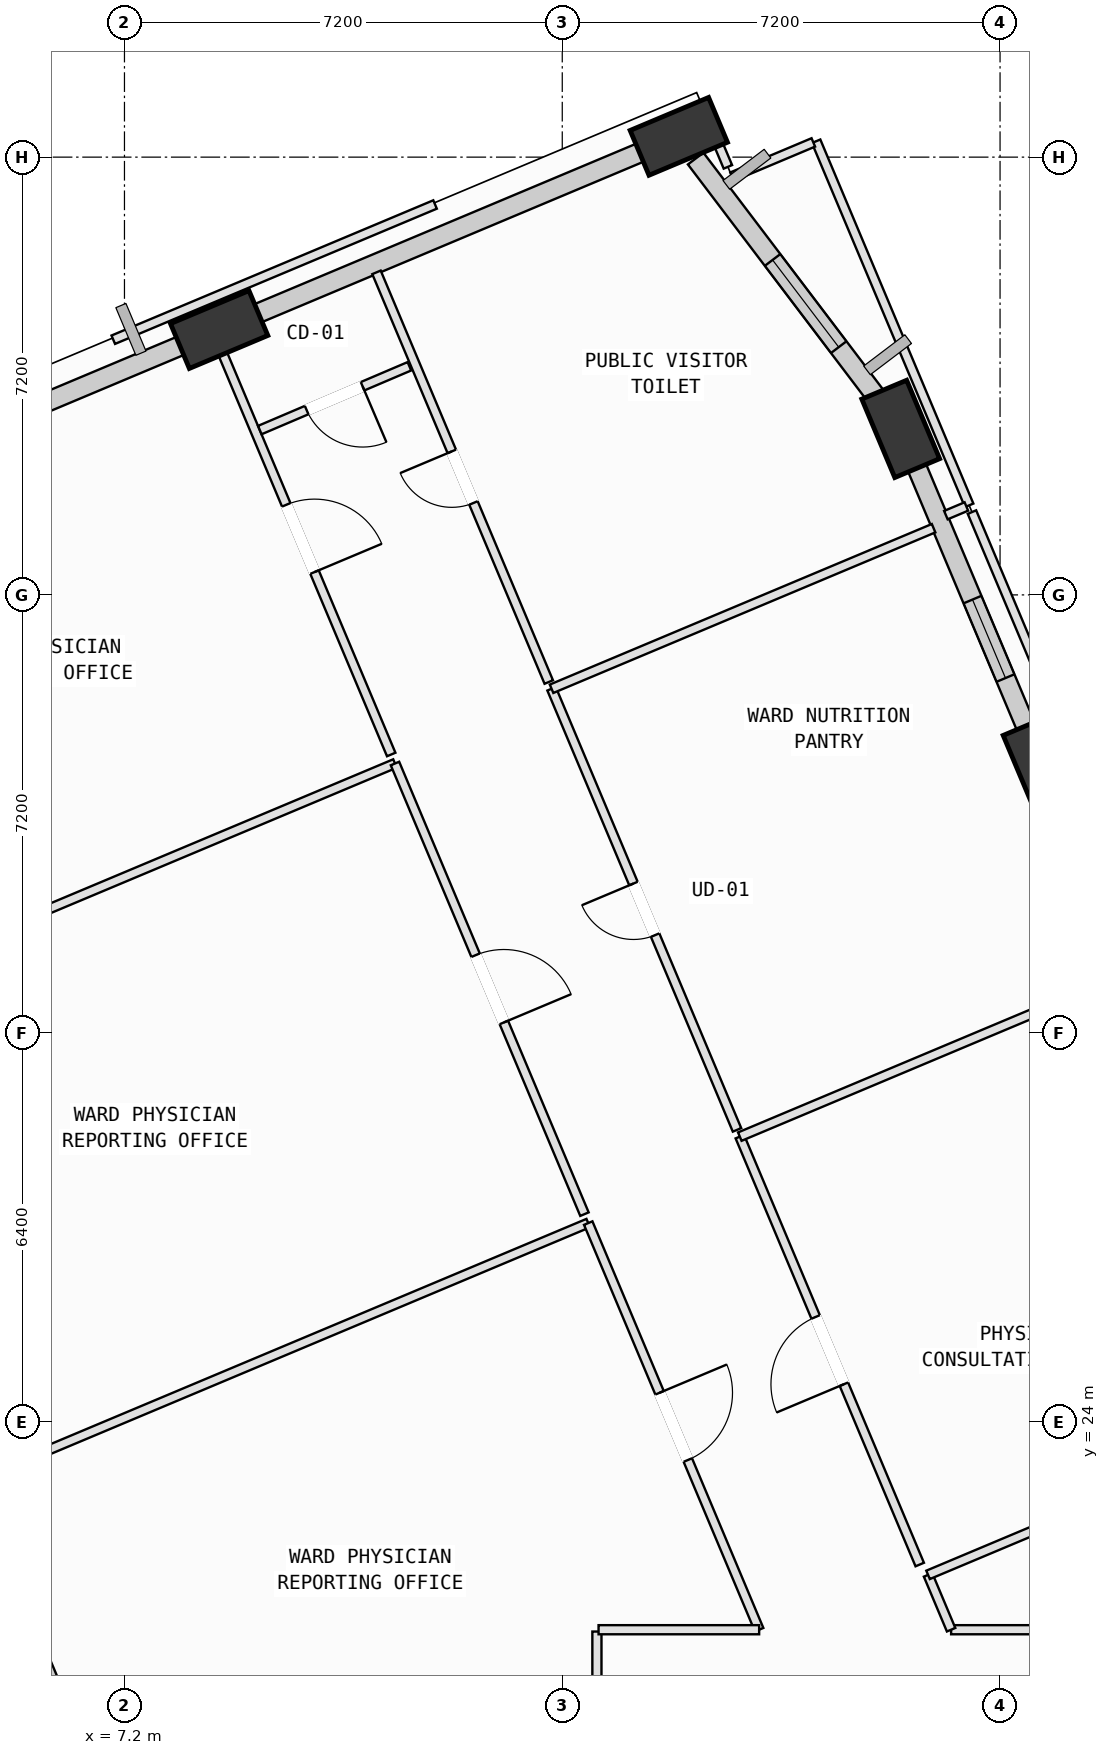
"""IFC4 building model, lengths in metres.
Left out: names, types, materials, properties, quantities, classifications, styles, units other than length and angle.
Written with IfcOpenShell. Run it as: python <this file> out.ifc"""

import sys

from ifc_helpers import new_model, si_unit, direction, frame, frame_2d, origin, origin_2d, place, context, subcontext, project, spatial, rectangle, extrude, element, fill, save


model = new_model("IFC4")
c1 = context("Model", 3, precision=1e-05, world=origin(), true_north=direction((0.0, 1.0)))
c2 = subcontext(c1, "Body", "Model", "MODEL_VIEW")
j1 = project(units=[si_unit("LENGTHUNIT", "METRE"), si_unit("PLANEANGLEUNIT", "RADIAN")], contexts=[c1])
p1 = place(None, origin())
s1 = spatial("IfcSite", under=j1, at=p1, CompositionType="ELEMENT")
p2 = place(p1, origin())
s2 = spatial("IfcBuilding", under=s1, at=p2, CompositionType="ELEMENT")
p3 = place(p2, frame((0.0, 0.0, 120.4)))
s3 = spatial("IfcBuildingStorey", under=s2, at=p3, CompositionType="ELEMENT", Elevation=120.4)
p4 = place(p3, frame((22.292, 34.799, 0.002), z_axis=(-0.040973075372, -0.047131231045, 0.998048021968), x_axis=(0.311183272161, 0.948604503294, 0.057571411811)))
e1 = element("IfcColumn", 1, at=p4, inside=s3, PredefinedType="COLUMN", context=c2, shape_type="SweptSolid", body=[
    extrude(rectangle(XDim=1.4, YDim=0.8, at=origin_2d()), origin(), (0.0, 0.0, 1.0), 4.004),
])
p5 = place(p3, frame((19.966, 40.33, 0.002), z_axis=(-0.063668290579, -0.056790167409, 0.996353966048), x_axis=(0.427498847838, 0.900588142351, 0.078649430732)))
e2 = element("IfcColumn", 2, at=p5, inside=s3, PredefinedType="COLUMN", context=c2, shape_type="SweptSolid", body=[
    extrude(rectangle(XDim=1.4, YDim=0.8, at=origin_2d()), origin(), (0.0, 0.0, 1.0), 4.011),
])
p6 = place(p3, frame((16.317, 45.142, 0.002), z_axis=(-0.083247666563, -0.071892952014, 0.993932205667), x_axis=(0.894040749575, -0.445953232902, 0.042624548837)))
e3 = element("IfcColumn", 3, at=p6, inside=s3, PredefinedType="COLUMN", context=c2, shape_type="SweptSolid", body=[
    extrude(rectangle(XDim=1.4, YDim=0.8, at=origin_2d()), origin(), (0.0, 0.0, 1.0), 4.021),
])
p7 = place(p3, frame((8.757, 41.964, 0.002), z_axis=(-0.069771417755, -0.102747656903, 0.992257460675), x_axis=(0.978659051429, -0.199775110531, 0.048128642913)))
e4 = element("IfcColumn", 4, at=p7, inside=s3, PredefinedType="COLUMN", context=c2, shape_type="SweptSolid", body=[
    extrude(rectangle(XDim=1.4, YDim=0.8, at=origin_2d()), origin(), (0.0, 0.0, 1.0), 4.028),
])
p8 = place(p3, frame((20.17, 39.847, 0.0), z_axis=(0.0, 0.0, 1.0), x_axis=(0.387505493495, -0.921867394212, 0.0)))
e5 = element("IfcWall", 5, at=p8, inside=s3, PredefinedType="SOLIDWALL", context=c2, shape_type="SweptSolid", body=[
    extrude(rectangle(XDim=5.047, YDim=0.32, at=frame_2d((2.523, 0.0))), origin(), (0.0, 0.0, 1.0), 3.165),
])
p9 = place(p8, frame((2.521, 0.0, 0.75)))
e6 = element("IfcOpeningElement", 6, at=p9, cuts=e5, PredefinedType="OPENING", context=c2, shape_type="SweptSolid", body=[
    extrude(rectangle(XDim=1.4, YDim=1.85, at=frame_2d((0.7, 0.925))), frame((0.0, 0.17, 0.0), z_axis=(0.0, -1.0, 0.0), x_axis=(1.0, 0.0, 0.0)), (0.0, 0.0, 1.0), 0.34),
])
p10 = place(p3, frame((16.594, 44.777, 0.0), z_axis=(0.0, 0.0, 1.0), x_axis=(0.604347929442, -0.796720515726, 0.0)))
e7 = element("IfcWall", 7, at=p10, inside=s3, PredefinedType="SOLIDWALL", context=c2, shape_type="SweptSolid", body=[
    extrude(rectangle(XDim=5.128, YDim=0.32, at=frame_2d((2.564, 0.0))), origin(), (0.0, 0.0, 1.0), 3.165),
])
p11 = place(p10, frame((2.094, 0.0, 0.75)))
e8 = element("IfcOpeningElement", 8, at=p11, cuts=e7, PredefinedType="OPENING", context=c2, shape_type="SweptSolid", body=[
    extrude(rectangle(XDim=1.8, YDim=2.05, at=frame_2d((0.9, 1.025))), frame((0.0, 0.17, 0.0), z_axis=(0.0, -1.0, 0.0), x_axis=(1.0, 0.0, 0.0)), (0.0, 0.0, 1.0), 0.34),
])
p12 = place(p3, frame((9.004, 42.068, 0.0), z_axis=(0.0, 0.0, 1.0), x_axis=(0.921864651892, 0.387512017352, 0.0)))
e9 = element("IfcWall", 9, at=p12, inside=s3, PredefinedType="SOLIDWALL", context=c2, shape_type="SweptSolid", body=[
    extrude(rectangle(XDim=7.231, YDim=0.32, at=frame_2d((3.615, 0.0))), origin(), (0.0, 0.0, 1.0), 3.165),
])
p13 = place(p3, frame((1.422, 38.881, 0.0), z_axis=(0.0, 0.0, 1.0), x_axis=(0.921872247249, 0.387493948019, 0.0)))
e10 = element("IfcWall", 10, at=p13, inside=s3, PredefinedType="SOLIDWALL", context=c2, shape_type="SweptSolid", body=[
    extrude(rectangle(XDim=7.27, YDim=0.32, at=frame_2d((3.635, 0.0))), origin(), (0.0, 0.0, 1.0), 3.165),
])
p14 = place(p3, frame((7.435, 16.208, 0.0), z_axis=(0.0, 0.0, 1.0), x_axis=(-0.387540340387, 0.921852745601, 0.0)))
e11 = element("IfcWall", 11, at=p14, inside=s3, PredefinedType="SOLIDWALL", context=c2, shape_type="SweptSolid", body=[
    extrude(rectangle(XDim=5.662, YDim=0.32, at=frame_2d((2.831, 0.0))), origin(), (0.0, 0.0, 1.0), 3.165),
])
p15 = place(p14, frame((2.23, 0.0, 0.75)))
e12 = element("IfcOpeningElement", 12, at=p15, cuts=e11, PredefinedType="OPENING", context=c2, shape_type="SweptSolid", body=[
    extrude(rectangle(XDim=1.2, YDim=1.75, at=frame_2d((0.6, 0.875))), frame((0.0, 0.17, 0.0), z_axis=(0.0, -1.0, 0.0), x_axis=(1.0, 0.0, 0.0)), (0.0, 0.0, 1.0), 0.34),
])
p16 = place(p3, frame((14.97, 20.55, 0.0), z_axis=(0.0, 0.0, 1.0), x_axis=(0.0, -1.0, 0.0)))
e13 = element("IfcWall", 13, at=p16, inside=s3, PredefinedType="PARTITIONING", context=c2, shape_type="SweptSolid", body=[
    extrude(rectangle(XDim=1.943, YDim=0.15, at=frame_2d((0.972, 0.0))), origin(), (0.0, 0.0, 1.0), 3.78),
])
p17 = place(p3, frame((4.719, 23.019, 0.0), z_axis=(0.0, 0.0, 1.0), x_axis=(0.921861546859, 0.387519403931, 0.0)))
e14 = element("IfcWall", 14, at=p17, inside=s3, PredefinedType="PARTITIONING", context=c2, shape_type="SweptSolid", body=[
    extrude(rectangle(XDim=10.965, YDim=0.15, at=frame_2d((5.482, 0.0))), origin(), (0.0, 0.0, 1.0), 3.78),
])
p18 = place(p3, frame((14.827, 27.268, 0.0), z_axis=(0.0, 0.0, 1.0), x_axis=(0.387476197679, -0.921879708114, 0.0)))
e15 = element("IfcWall", 15, at=p18, inside=s3, PredefinedType="PARTITIONING", context=c2, shape_type="SweptSolid", body=[
    extrude(rectangle(XDim=7.255, YDim=0.15, at=frame_2d((3.627, 0.0))), origin(), (0.0, 0.0, 1.0), 3.78),
])
p19 = place(p18, frame((3.027, 0.0, 0.0)))
e16 = element("IfcOpeningElement", 16, at=p19, cuts=e15, PredefinedType="OPENING", context=c2, shape_type="SweptSolid", body=[
    extrude(rectangle(XDim=1.2, YDim=2.15, at=frame_2d((0.6, 1.075))), frame((0.0, 0.085, 0.0), z_axis=(0.0, -1.0, 0.0), x_axis=(1.0, 0.0, 0.0)), (0.0, 0.0, 1.0), 0.17),
])
p20 = place(p3, frame((17.638, 20.58, 0.0), z_axis=(0.0, 0.0, 1.0), x_axis=(-1.0, 0.0, 0.0)))
e17 = element("IfcWall", 17, at=p20, inside=s3, PredefinedType="PARTITIONING", context=c2, shape_type="SweptSolid", body=[
    extrude(rectangle(XDim=2.641, YDim=0.15, at=frame_2d((1.32, 0.0))), origin(), (0.0, 0.0, 1.0), 3.78),
])
p21 = place(p3, frame((1.541, 30.579, 0.0), z_axis=(0.0, 0.0, 1.0), x_axis=(0.921901315363, 0.387424785904, 0.0)))
e18 = element("IfcWall", 18, at=p21, inside=s3, PredefinedType="PARTITIONING", context=c2, shape_type="SweptSolid", body=[
    extrude(rectangle(XDim=10.964, YDim=0.15, at=frame_2d((5.482, 0.0))), origin(), (0.0, 0.0, 1.0), 3.78),
])
p22 = place(p3, frame((11.649, 34.827, 0.0), z_axis=(0.0, 0.0, 1.0), x_axis=(0.387547881375, -0.921849575387, 0.0)))
e19 = element("IfcWall", 19, at=p22, inside=s3, PredefinedType="PARTITIONING", context=c2, shape_type="SweptSolid", body=[
    extrude(rectangle(XDim=8.04, YDim=0.15, at=frame_2d((4.02, 0.0))), origin(), (0.0, 0.0, 1.0), 3.78),
])
p23 = place(p22, frame((3.42, 0.0, 0.0)))
e20 = element("IfcOpeningElement", 20, at=p23, cuts=e19, PredefinedType="OPENING", context=c2, shape_type="SweptSolid", body=[
    extrude(rectangle(XDim=1.2, YDim=2.15, at=frame_2d((0.6, 1.075))), frame((0.0, 0.085, 0.0), z_axis=(0.0, -1.0, 0.0), x_axis=(1.0, 0.0, 0.0)), (0.0, 0.0, 1.0), 0.17),
])
p24 = place(p3, frame((8.058, 41.855, 0.0), z_axis=(0.0, 0.0, 1.0), x_axis=(0.922089032522, 0.386977797945, 0.0)))
e21 = element("IfcWall", 21, at=p24, inside=s3, PredefinedType="PARTITIONING", context=c2, shape_type="SweptSolid", body=[
    extrude(rectangle(XDim=0.587, YDim=0.15, at=frame_2d((0.293, 0.0))), origin(), (0.0, 0.0, 1.0), 3.78),
])
p25 = place(p3, frame((8.599, 42.082, 0.0), z_axis=(0.0, 0.0, 1.0), x_axis=(0.387550108115, -0.921848639257, 0.0)))
e22 = element("IfcWall", 22, at=p25, inside=s3, PredefinedType="PARTITIONING", context=c2, shape_type="SweptSolid", body=[
    extrude(rectangle(XDim=7.709, YDim=0.15, at=frame_2d((3.855, 0.0))), origin(), (0.0, 0.0, 1.0), 2.965),
])
p26 = place(p25, frame((3.255, 0.0, 0.0)))
e23 = element("IfcOpeningElement", 23, at=p26, cuts=e22, PredefinedType="OPENING", context=c2, shape_type="SweptSolid", body=[
    extrude(rectangle(XDim=1.2, YDim=2.15, at=frame_2d((0.6, 1.075))), frame((0.0, 0.085, 0.0), z_axis=(0.0, -1.0, 0.0), x_axis=(1.0, 0.0, 0.0)), (0.0, 0.0, 1.0), 0.17),
])
p27 = place(p3, frame((27.428, 20.58, 0.0), z_axis=(0.0, 0.0, 1.0), x_axis=(-1.0, 0.0, 0.0)))
e24 = element("IfcWall", 24, at=p27, inside=s3, PredefinedType="PARTITIONING", context=c2, shape_type="SweptSolid", body=[
    extrude(rectangle(XDim=6.633, YDim=0.15, at=frame_2d((3.316, 0.0))), origin(), (0.0, 0.0, 1.0), 3.78),
])
p28 = place(p27, frame((2.717, 0.0, 0.0)))
e25 = element("IfcOpeningElement", 25, at=p28, cuts=e24, PredefinedType="OPENING", context=c2, shape_type="SweptSolid", body=[
    extrude(rectangle(XDim=1.2, YDim=2.15, at=frame_2d((0.6, 1.075))), frame((0.0, 0.085, 0.0), z_axis=(0.0, -1.0, 0.0), x_axis=(1.0, 0.0, 0.0)), (0.0, 0.0, 1.0), 0.17),
])
p29 = place(p3, frame((20.795, 20.58, 0.0), z_axis=(0.0, 0.0, 1.0), x_axis=(-0.387342801036, 0.921935764837, 0.0)))
e26 = element("IfcWall", 26, at=p29, inside=s3, PredefinedType="PARTITIONING", context=c2, shape_type="SweptSolid", body=[
    extrude(rectangle(XDim=0.978, YDim=0.15, at=frame_2d((0.489, 0.0))), origin(), (0.0, 0.0, 1.0), 3.78),
])
p30 = place(p3, frame((20.416, 21.482, 0.0), z_axis=(0.0, 0.0, 1.0), x_axis=(0.921833906967, 0.38758514931, 0.0)))
e27 = element("IfcWall", 27, at=p30, inside=s3, PredefinedType="PARTITIONING", context=c2, shape_type="SweptSolid", body=[
    extrude(rectangle(XDim=6.755, YDim=0.15, at=frame_2d((3.377, 0.0))), origin(), (0.0, 0.0, 1.0), 3.78),
])
p31 = place(p3, frame((20.279, 21.652, 0.0), z_axis=(0.0, 0.0, 1.0), x_axis=(-0.38757659616, 0.921837503093, 0.0)))
e28 = element("IfcWall", 28, at=p31, inside=s3, PredefinedType="PARTITIONING", context=c2, shape_type="SweptSolid", body=[
    extrude(rectangle(XDim=7.635, YDim=0.15, at=frame_2d((3.817, 0.0))), origin(), (0.0, 0.0, 1.0), 3.78),
])
p32 = place(p31, frame((3.217, 0.0, 0.0)))
e29 = element("IfcOpeningElement", 29, at=p32, cuts=e28, PredefinedType="OPENING", context=c2, shape_type="SweptSolid", body=[
    extrude(rectangle(XDim=1.2, YDim=2.15, at=frame_2d((0.6, 1.075))), frame((0.0, 0.085, 0.0), z_axis=(0.0, -1.0, 0.0), x_axis=(1.0, 0.0, 0.0)), (0.0, 0.0, 1.0), 0.17),
])
p33 = place(p3, frame((17.32, 28.69, 0.0), z_axis=(0.0, 0.0, 1.0), x_axis=(0.921811932434, 0.387637409473, 0.0)))
e30 = element("IfcWall", 30, at=p33, inside=s3, PredefinedType="PARTITIONING", context=c2, shape_type="SweptSolid", body=[
    extrude(rectangle(XDim=6.816, YDim=0.15, at=frame_2d((3.408, 0.0))), origin(), (0.0, 0.0, 1.0), 3.78),
])
p34 = place(p3, frame((17.274, 28.801, 0.0), z_axis=(0.0, 0.0, 1.0), x_axis=(-0.387529923364, 0.921857124775, 0.0)))
e31 = element("IfcWall", 31, at=p34, inside=s3, PredefinedType="PARTITIONING", context=c2, shape_type="SweptSolid", body=[
    extrude(rectangle(XDim=7.87, YDim=0.15, at=frame_2d((3.935, 0.0))), origin(), (0.0, 0.0, 1.0), 3.78),
])
p35 = place(p34, frame((3.475, 0.0, 0.0)))
e32 = element("IfcOpeningElement", 32, at=p35, cuts=e31, PredefinedType="OPENING", context=c2, shape_type="SweptSolid", body=[
    extrude(rectangle(XDim=0.92, YDim=2.1, at=frame_2d((0.46, 1.05))), frame((0.0, 0.085, 0.0), z_axis=(0.0, -1.0, 0.0), x_axis=(1.0, 0.0, 0.0)), (0.0, 0.0, 1.0), 0.17),
])
p36 = place(p3, frame((14.224, 36.056, 0.0), z_axis=(0.0, 0.0, 1.0), x_axis=(0.921863124429, 0.387515651062, 0.0)))
e33 = element("IfcWall", 33, at=p36, inside=s3, PredefinedType="PARTITIONING", context=c2, shape_type="SweptSolid", body=[
    extrude(rectangle(XDim=6.815, YDim=0.15, at=frame_2d((3.408, 0.0))), origin(), (0.0, 0.0, 1.0), 3.78),
])
p37 = place(p3, frame((21.138, 38.962, 0.0), z_axis=(0.0, 0.0, 1.0), x_axis=(0.387556286233, -0.921846041919, 0.0)))
e34 = element("IfcWall", 34, at=p37, inside=s3, PredefinedType="PARTITIONING", context=c2, shape_type="SweptSolid", body=[
    extrude(rectangle(XDim=7.87, YDim=0.15, at=frame_2d((3.935, 0.0))), origin(), (0.0, 0.0, 1.0), 3.78),
])
p38 = place(p3, frame((18.575, 45.061, 0.0), z_axis=(0.0, 0.0, 1.0), x_axis=(0.387509152275, -0.921865856241, 0.0)))
e35 = element("IfcWall", 35, at=p38, inside=s3, PredefinedType="PARTITIONING", context=c2, shape_type="SweptSolid", body=[
    extrude(rectangle(XDim=6.496, YDim=0.15, at=frame_2d((3.248, 0.0))), origin(), (0.0, 0.0, 1.0), 3.78),
])
p39 = place(p3, frame((21.046, 39.054, 0.0), z_axis=(0.0, 0.0, 1.0), x_axis=(-0.921647946152, -0.388027142547, 0.0)))
e36 = element("IfcWall", 36, at=p39, inside=s3, PredefinedType="PARTITIONING", context=c2, shape_type="SweptSolid", body=[
    extrude(rectangle(XDim=0.365, YDim=0.15, at=frame_2d((0.183, 0.0))), origin(), (0.0, 0.0, 1.0), 3.78),
])
p40 = place(p3, frame((14.178, 36.167, 0.0), z_axis=(0.0, 0.0, 1.0), x_axis=(-0.387585091444, 0.921833931297, 0.0)))
e37 = element("IfcWall", 37, at=p40, inside=s3, PredefinedType="PARTITIONING", context=c2, shape_type="SweptSolid", body=[
    extrude(rectangle(XDim=7.309, YDim=0.15, at=frame_2d((3.655, 0.0))), origin(), (0.0, 0.0, 1.0), 3.78),
])
p41 = place(p40, frame((3.195, 0.0, 0.0)))
e38 = element("IfcOpeningElement", 38, at=p41, cuts=e37, PredefinedType="OPENING", context=c2, shape_type="SweptSolid", body=[
    extrude(rectangle(XDim=0.92, YDim=2.1, at=frame_2d((0.46, 1.05))), frame((0.0, 0.085, 0.0), z_axis=(0.0, -1.0, 0.0), x_axis=(1.0, 0.0, 0.0)), (0.0, 0.0, 1.0), 0.17),
])
p42 = place(p3, frame((15.596, 45.045, 0.0), z_axis=(0.0, 0.0, 1.0), x_axis=(0.92186648398, 0.38750765891, 0.0)))
e39 = element("IfcWall", 39, at=p42, inside=s3, PredefinedType="PARTITIONING", context=c2, shape_type="SweptSolid", body=[
    extrude(rectangle(XDim=1.252, YDim=0.15, at=frame_2d((0.626, 0.0))), origin(), (0.0, 0.0, 1.0), 3.165),
])
p43 = place(p3, frame((16.769, 45.484, 0.0), z_axis=(0.0, 0.0, 1.0), x_axis=(0.387699355128, -0.921785880795, 0.0)))
e40 = element("IfcWall", 40, at=p43, inside=s3, PredefinedType="PARTITIONING", context=c2, shape_type="SweptSolid", body=[
    extrude(rectangle(XDim=0.916, YDim=0.15, at=frame_2d((0.458, 0.0))), origin(), (0.0, 0.0, 1.0), 3.78),
])
p44 = place(p3, frame((17.192, 44.479, 0.0), z_axis=(0.0, 0.0, 1.0), x_axis=(0.921641710071, 0.388041954249, 0.0)))
e41 = element("IfcWall", 41, at=p44, inside=s3, PredefinedType="PARTITIONING", context=c2, shape_type="SweptSolid", body=[
    extrude(rectangle(XDim=1.451, YDim=0.15, at=frame_2d((0.726, 0.0))), origin(), (0.0, 0.0, 1.0), 3.78),
])
p45 = place(p3, frame((7.016, 41.797, 0.0), z_axis=(0.0, 0.0, 1.0), x_axis=(0.921904949916, 0.387416137146, 0.0)))
e42 = element("IfcWall", 42, at=p45, inside=s3, PredefinedType="PARTITIONING", context=c2, shape_type="SweptSolid", body=[
    extrude(rectangle(XDim=5.74, YDim=0.15, at=frame_2d((2.87, 0.0))), origin(), (0.0, 0.0, 1.0), 3.78),
])
p46 = place(p3, frame((11.886, 41.36, 0.0), z_axis=(0.0, 0.0, 1.0), x_axis=(-0.919847133492, -0.392277008001, 0.0)))
e43 = element("IfcWall", 43, at=p46, inside=s3, PredefinedType="PARTITIONING", context=c2, shape_type="SweptSolid", body=[
    extrude(rectangle(XDim=2.674, YDim=0.15, at=frame_2d((1.337, 0.0))), origin(), (0.0, 0.0, 1.0), 3.78),
])
p47 = place(p46, frame((0.837, 0.0, 0.0)))
e44 = element("IfcOpeningElement", 44, at=p47, cuts=e43, PredefinedType="OPENING", context=c2, shape_type="SweptSolid", body=[
    extrude(rectangle(XDim=1.0, YDim=2.12, at=frame_2d((0.5, 1.06))), frame((0.0, 0.085, 0.0), z_axis=(0.0, -1.0, 0.0), x_axis=(1.0, 0.0, 0.0)), (0.0, 0.0, 1.0), 0.17),
])
p48 = place(p9, origin())
e45 = element("IfcWindow", 45, at=p48, inside=s3, PartitioningType="SINGLE_PANEL", PredefinedType="WINDOW", context=c2, shape_type="SweptSolid", body=[
    extrude(rectangle(XDim=1.4, YDim=1.85, at=frame_2d((0.7, 0.925))), frame((0.0, 0.03, 0.0), z_axis=(0.0, -1.0, 0.0), x_axis=(1.0, 0.0, 0.0)), (0.0, 0.0, 1.0), 0.06),
])
fill(e6, e45)
p49 = place(p11, origin())
e46 = element("IfcWindow", 46, at=p49, inside=s3, PartitioningType="SINGLE_PANEL", PredefinedType="WINDOW", context=c2, shape_type="SweptSolid", body=[
    extrude(rectangle(XDim=1.8, YDim=2.05, at=frame_2d((0.9, 1.025))), frame((0.0, 0.03, 0.0), z_axis=(0.0, -1.0, 0.0), x_axis=(1.0, 0.0, 0.0)), (0.0, 0.0, 1.0), 0.06),
])
fill(e8, e46)
p50 = place(p19, origin())
e47 = element("IfcDoor", 47, at=p50, inside=s3, OperationType="SINGLE_SWING_LEFT", PredefinedType="DOOR", context=c2, shape_type="SweptSolid", body=[
    extrude(rectangle(XDim=1.2, YDim=2.15, at=frame_2d((0.6, 1.075))), frame((0.0, 0.025, 0.0), z_axis=(0.0, -1.0, 0.0), x_axis=(1.0, 0.0, 0.0)), (0.0, 0.0, 1.0), 0.05),
])
fill(e16, e47)
p51 = place(p23, origin())
e48 = element("IfcDoor", 48, at=p51, inside=s3, OperationType="SINGLE_SWING_RIGHT", PredefinedType="DOOR", context=c2, shape_type="SweptSolid", body=[
    extrude(rectangle(XDim=1.2, YDim=2.15, at=frame_2d((0.6, 1.075))), frame((0.0, 0.025, 0.0), z_axis=(0.0, -1.0, 0.0), x_axis=(1.0, 0.0, 0.0)), (0.0, 0.0, 1.0), 0.05),
])
fill(e20, e48)
p52 = place(p26, origin())
e49 = element("IfcDoor", 49, at=p52, inside=s3, OperationType="SINGLE_SWING_RIGHT", PredefinedType="DOOR", context=c2, shape_type="SweptSolid", body=[
    extrude(rectangle(XDim=1.2, YDim=2.15, at=frame_2d((0.6, 1.075))), frame((0.0, 0.025, 0.0), z_axis=(0.0, -1.0, 0.0), x_axis=(1.0, 0.0, 0.0)), (0.0, 0.0, 1.0), 0.05),
])
fill(e23, e49)
p53 = place(p32, origin())
e50 = element("IfcDoor", 50, at=p53, inside=s3, OperationType="SINGLE_SWING_LEFT", PredefinedType="DOOR", context=c2, shape_type="SweptSolid", body=[
    extrude(rectangle(XDim=1.2, YDim=2.15, at=frame_2d((0.6, 1.075))), frame((0.0, 0.025, 0.0), z_axis=(0.0, -1.0, 0.0), x_axis=(1.0, 0.0, 0.0)), (0.0, 0.0, 1.0), 0.05),
])
fill(e29, e50)
p54 = place(p35, origin())
e51 = element("IfcDoor", 51, at=p54, inside=s3, OperationType="SINGLE_SWING_RIGHT", PredefinedType="DOOR", context=c2, shape_type="SweptSolid", body=[
    extrude(rectangle(XDim=0.92, YDim=2.1, at=frame_2d((0.46, 1.05))), frame((0.0, 0.025, 0.0), z_axis=(0.0, -1.0, 0.0), x_axis=(1.0, 0.0, 0.0)), (0.0, 0.0, 1.0), 0.05),
])
fill(e32, e51)
p55 = place(p41, origin())
e52 = element("IfcDoor", 52, at=p55, inside=s3, OperationType="SINGLE_SWING_RIGHT", PredefinedType="DOOR", context=c2, shape_type="SweptSolid", body=[
    extrude(rectangle(XDim=0.92, YDim=2.1, at=frame_2d((0.46, 1.05))), frame((0.0, 0.025, 0.0), z_axis=(0.0, -1.0, 0.0), x_axis=(1.0, 0.0, 0.0)), (0.0, 0.0, 1.0), 0.05),
])
fill(e38, e52)
p56 = place(p47, origin())
e53 = element("IfcDoor", 53, at=p56, inside=s3, OperationType="SINGLE_SWING_LEFT", PredefinedType="DOOR", context=c2, shape_type="SweptSolid", body=[
    extrude(rectangle(XDim=1.0, YDim=2.12, at=frame_2d((0.5, 1.06))), frame((0.0, 0.025, 0.0), z_axis=(0.0, -1.0, 0.0), x_axis=(1.0, 0.0, 0.0)), (0.0, 0.0, 1.0), 0.05),
])
fill(e44, e53)
save(model, sys.argv[1])
